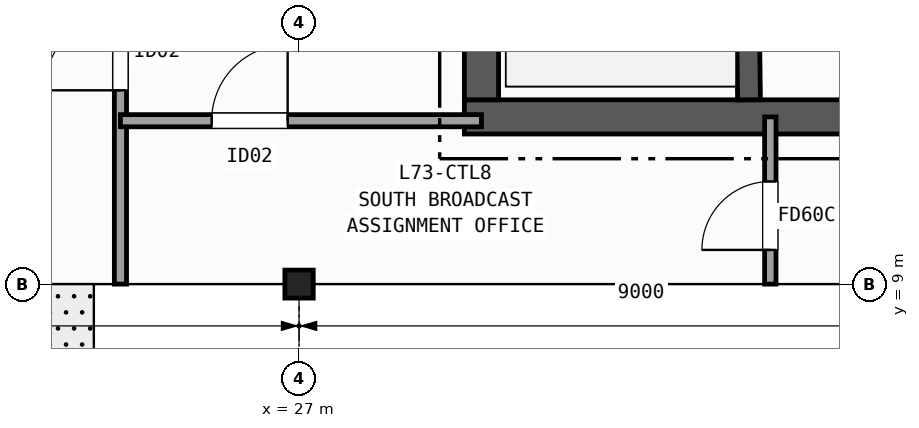
"""IFC4 building model, lengths in metres.
Left out: names, types, materials, properties, quantities, classifications, styles, units other than length and angle.
Written with IfcOpenShell. Run it as: python <this file> out.ifc"""

import sys

from ifc_helpers import new_model, si_unit, direction, frame, frame_2d, origin, origin_2d, place, context, subcontext, project, spatial, rectangle, i_section, extrude, element, fill, save


model = new_model("IFC4")
c1 = context("Model", 3, precision=1e-05, world=origin(), true_north=direction((0.0, 1.0)))
c2 = subcontext(c1, "Body", "Model", "MODEL_VIEW")
j1 = project(units=[si_unit("LENGTHUNIT", "METRE"), si_unit("PLANEANGLEUNIT", "RADIAN")], contexts=[c1])
p1 = place(None, origin())
s1 = spatial("IfcSite", under=j1, at=p1, CompositionType="ELEMENT")
p2 = place(p1, origin())
s2 = spatial("IfcBuilding", under=s1, at=p2, CompositionType="ELEMENT")
p3 = place(p2, frame((0.0, 0.0, 290.0)))
s3 = spatial("IfcBuildingStorey", under=s2, at=p3, CompositionType="ELEMENT", Elevation=290.0)
p4 = place(p3, frame((27.0, 9.0, 0.0), z_axis=(0.0, 0.0, 1.0), x_axis=(1.0, 0.0, 0.0)))
e1 = element("IfcColumn", 1, at=p4, inside=s3, PredefinedType="COLUMN", context=c2, shape_type="SweptSolid", body=[
    extrude(i_section(OverallWidth=0.373, OverallDepth=0.368, WebThickness=0.015, FlangeThickness=0.024, FilletRadius=0.015, at=origin_2d()), origin(), (0.0, 0.0, 1.0), 3.7),
])
p5 = place(p3, frame((29.175, 11.2, 0.0), z_axis=(0.0, 0.0, 1.0), x_axis=(1.0, 0.0, 0.0)))
e2 = element("IfcWall", 2, at=p5, inside=s3, PredefinedType="SHEAR", context=c2, shape_type="SweptSolid", body=[
    extrude(rectangle(XDim=13.85, YDim=0.45, at=frame_2d((6.925, 0.0))), origin(), (0.0, 0.0, 1.0), 3.42),
])
p6 = place(p3, frame((29.4, 24.375, 0.0), z_axis=(0.0, 0.0, 1.0), x_axis=(0.0, -1.0, 0.0)))
e3 = element("IfcWall", 3, at=p6, inside=s3, PredefinedType="SHEAR", context=c2, shape_type="SweptSolid", body=[
    extrude(rectangle(XDim=12.95, YDim=0.45, at=frame_2d((6.475, 0.0))), origin(), (0.0, 0.0, 1.0), 3.42),
])
p7 = place(p6, frame((1.475, 0.0, 0.0)))
e4 = element("IfcOpeningElement", 4, at=p7, cuts=e3, PredefinedType="OPENING", context=c2, shape_type="SweptSolid", body=[
    extrude(rectangle(XDim=1.35, YDim=2.15, at=frame_2d((0.675, 1.075))), frame((0.0, 0.235, 0.0), z_axis=(0.0, -1.0, 0.0), x_axis=(1.0, 0.0, 0.0)), (0.0, 0.0, 1.0), 0.47),
])
p8 = place(p3, frame((32.92, 11.425, 0.0), z_axis=(0.0, 0.0, 1.0), x_axis=(-0.013135638869, 0.999913723774, 0.0)))
e5 = element("IfcWall", 5, at=p8, inside=s3, PredefinedType="SHEAR", context=c2, shape_type="SweptSolid", body=[
    extrude(rectangle(XDim=9.126, YDim=0.3, at=frame_2d((4.563, 0.0))), origin(), (0.0, 0.0, 1.0), 3.42),
])
p9 = place(p3, frame((24.65, 9.0, 0.0), z_axis=(0.0, 0.0, 1.0), x_axis=(0.0, 1.0, 0.0)))
e6 = element("IfcWall", 6, at=p9, inside=s3, PredefinedType="PARTITIONING", context=c2, shape_type="SweptSolid", body=[
    extrude(rectangle(XDim=19.2, YDim=0.16, at=frame_2d((9.6, 0.0))), origin(), (0.0, 0.0, 1.0), 2.707),
])
p10 = place(p9, frame((15.2, 0.0, 0.0)))
e7 = element("IfcOpeningElement", 7, at=p10, cuts=e6, PredefinedType="OPENING", context=c2, shape_type="SweptSolid", body=[
    extrude(rectangle(XDim=1.2, YDim=2.15, at=frame_2d((0.6, 1.075))), frame((0.0, 0.09, 0.0), z_axis=(0.0, -1.0, 0.0), x_axis=(1.0, 0.0, 0.0)), (0.0, 0.0, 1.0), 0.18),
])
p11 = place(p9, frame((10.5, 0.0, 0.0)))
e8 = element("IfcOpeningElement", 8, at=p11, cuts=e6, PredefinedType="OPENING", context=c2, shape_type="SweptSolid", body=[
    extrude(rectangle(XDim=0.86, YDim=2.05, at=frame_2d((0.43, 1.025))), frame((0.0, 0.09, 0.0), z_axis=(0.0, -1.0, 0.0), x_axis=(1.0, 0.0, 0.0)), (0.0, 0.0, 1.0), 0.18),
])
p12 = place(p9, frame((6.0, 0.0, 0.0)))
e9 = element("IfcOpeningElement", 9, at=p12, cuts=e6, PredefinedType="OPENING", context=c2, shape_type="SweptSolid", body=[
    extrude(rectangle(XDim=0.95, YDim=2.1, at=frame_2d((0.475, 1.05))), frame((0.0, 0.09, 0.0), z_axis=(0.0, -1.0, 0.0), x_axis=(1.0, 0.0, 0.0)), (0.0, 0.0, 1.0), 0.18),
])
p13 = place(p9, frame((2.55, 0.0, 0.0)))
e10 = element("IfcOpeningElement", 10, at=p13, cuts=e6, PredefinedType="OPENING", context=c2, shape_type="SweptSolid", body=[
    extrude(rectangle(XDim=1.0, YDim=2.1, at=frame_2d((0.5, 1.05))), frame((0.0, 0.09, 0.0), z_axis=(0.0, -1.0, 0.0), x_axis=(1.0, 0.0, 0.0)), (0.0, 0.0, 1.0), 0.18),
])
p14 = place(p3, frame((24.65, 11.15, 0.0), z_axis=(0.0, 0.0, 1.0), x_axis=(1.0, 0.0, 0.0)))
e11 = element("IfcWall", 11, at=p14, inside=s3, PredefinedType="PARTITIONING", context=c2, shape_type="SweptSolid", body=[
    extrude(rectangle(XDim=4.75, YDim=0.16, at=frame_2d((2.375, 0.0))), origin(), (0.0, 0.0, 1.0), 2.792),
])
p15 = place(p14, frame((1.2, 0.0, 0.0)))
e12 = element("IfcOpeningElement", 12, at=p15, cuts=e11, PredefinedType="OPENING", context=c2, shape_type="SweptSolid", body=[
    extrude(rectangle(XDim=1.0, YDim=2.1, at=frame_2d((0.5, 1.05))), frame((0.0, 0.09, 0.0), z_axis=(0.0, -1.0, 0.0), x_axis=(1.0, 0.0, 0.0)), (0.0, 0.0, 1.0), 0.18),
])
p16 = place(p3, frame((33.2, 9.0, 0.0), z_axis=(0.0, 0.0, 1.0), x_axis=(0.0, 1.0, 0.0)))
e13 = element("IfcWall", 13, at=p16, inside=s3, PredefinedType="PARTITIONING", context=c2, shape_type="SweptSolid", body=[
    extrude(rectangle(XDim=2.2, YDim=0.15, at=frame_2d((1.1, 0.0))), origin(), (0.0, 0.0, 1.0), 2.707),
])
p17 = place(p16, frame((0.45, 0.0, 0.0)))
e14 = element("IfcOpeningElement", 14, at=p17, cuts=e13, PredefinedType="OPENING", context=c2, shape_type="SweptSolid", body=[
    extrude(rectangle(XDim=0.9, YDim=2.1, at=frame_2d((0.45, 1.05))), frame((0.0, 0.085, 0.0), z_axis=(0.0, -1.0, 0.0), x_axis=(1.0, 0.0, 0.0)), (0.0, 0.0, 1.0), 0.17),
])
p18 = place(p13, origin())
e15 = element("IfcDoor", 15, at=p18, inside=s3, OperationType="SINGLE_SWING_LEFT", PredefinedType="DOOR", context=c2, shape_type="SweptSolid", body=[
    extrude(rectangle(XDim=1.0, YDim=2.1, at=frame_2d((0.5, 1.05))), frame((0.0, 0.025, 0.0), z_axis=(0.0, -1.0, 0.0), x_axis=(1.0, 0.0, 0.0)), (0.0, 0.0, 1.0), 0.05),
])
fill(e10, e15)
p19 = place(p15, origin())
e16 = element("IfcDoor", 16, at=p19, inside=s3, OperationType="SINGLE_SWING_RIGHT", PredefinedType="DOOR", context=c2, shape_type="SweptSolid", body=[
    extrude(rectangle(XDim=1.0, YDim=2.1, at=frame_2d((0.5, 1.05))), frame((0.0, 0.025, 0.0), z_axis=(0.0, -1.0, 0.0), x_axis=(1.0, 0.0, 0.0)), (0.0, 0.0, 1.0), 0.05),
])
fill(e12, e16)
p20 = place(p17, origin())
e17 = element("IfcDoor", 17, at=p20, inside=s3, OperationType="SINGLE_SWING_LEFT", PredefinedType="DOOR", context=c2, shape_type="SweptSolid", body=[
    extrude(rectangle(XDim=0.9, YDim=2.1, at=frame_2d((0.45, 1.05))), frame((0.0, 0.025, 0.0), z_axis=(0.0, -1.0, 0.0), x_axis=(1.0, 0.0, 0.0)), (0.0, 0.0, 1.0), 0.05),
])
fill(e14, e17)
save(model, sys.argv[1])
